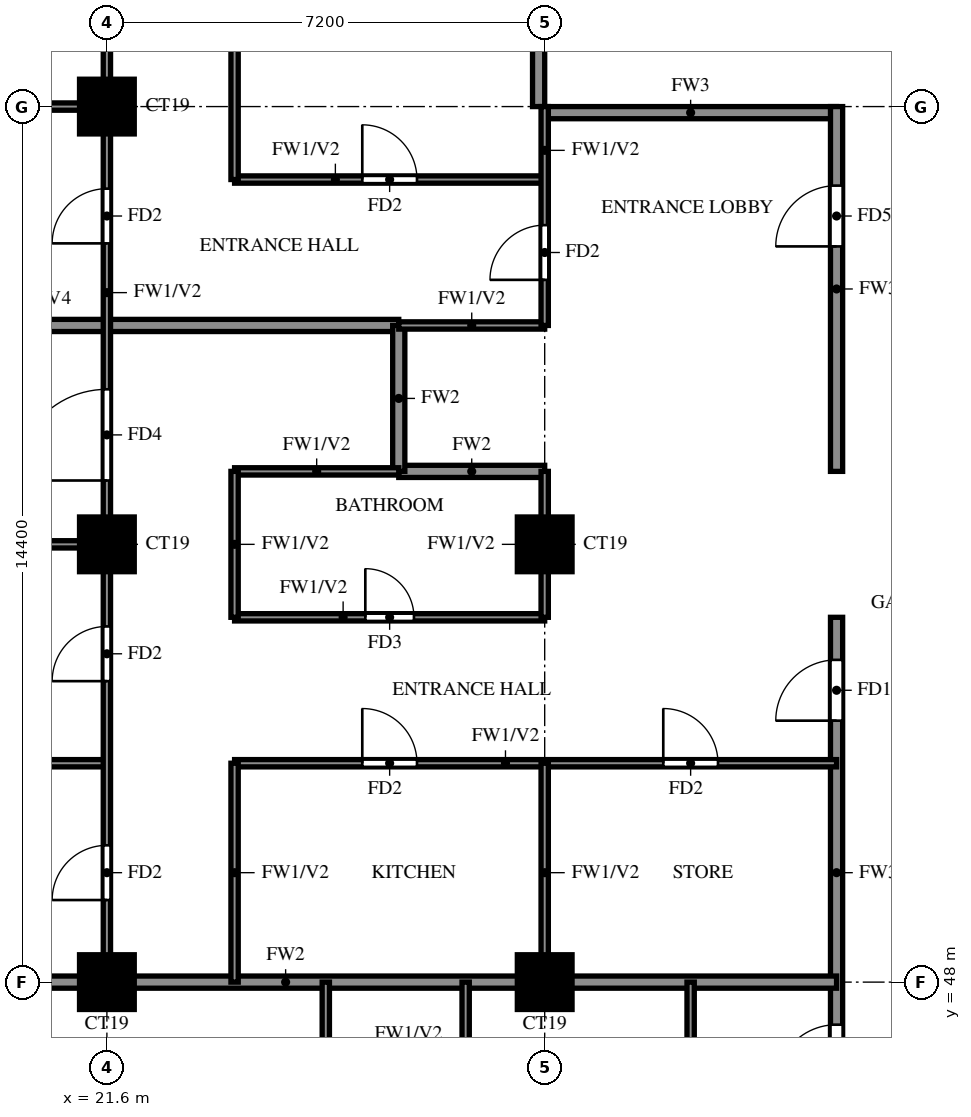
"""IFC4 building model, lengths in metres.
Left out: names, types, materials, properties, quantities, classifications, styles, units other than length and angle.
Written with IfcOpenShell. Run it as: python <this file> out.ifc"""

import sys

from ifc_helpers import new_model, si_unit, direction, frame, frame_2d, origin, origin_2d, place, context, subcontext, project, spatial, rectangle, extrude, source, transform, mapped, element, fill, save


model = new_model("IFC4")
c1 = context("Model", 3, precision=1e-05, world=origin(), true_north=direction((0.0, 1.0)))
c2 = subcontext(c1, "Body", "Model", "MODEL_VIEW")
j1 = project(units=[si_unit("LENGTHUNIT", "METRE"), si_unit("PLANEANGLEUNIT", "RADIAN")], contexts=[c1])
p1 = place(None, origin())
s1 = spatial("IfcSite", under=j1, at=p1, CompositionType="ELEMENT")
p2 = place(p1, origin())
s2 = spatial("IfcBuilding", under=s1, at=p2, CompositionType="ELEMENT")
p3 = place(p2, frame((0.0, 0.0, 188.5)))
s3 = spatial("IfcBuildingStorey", under=s2, at=p3, CompositionType="ELEMENT", Elevation=188.5)
m1 = source(origin(), c2, "Body", "SweptSolid", [
    extrude(rectangle(XDim=0.9, YDim=0.9, at=origin_2d()), origin(), (0.0, 0.0, 1.0), 3.2),
])
for number, where, z_axis, x_axis in (
    (1, (21.6, 48.0, 0.0), (0.0, 0.0, 1.0), (1.0, 0.0, 0.0)),
    (2, (28.8, 48.0, 0.0), (0.0, 0.0, 1.0), (1.0, 0.0, 0.0)),
    (3, (21.6, 55.2, 0.0), (0.0, 0.0, 1.0), (1.0, 0.0, 0.0)),
    (4, (28.8, 55.2, 0.0), (0.0, 0.0, 1.0), (1.0, 0.0, 0.0)),
    (5, (21.6, 62.4, 0.0), (0.0, 0.0, 1.0), (1.0, 0.0, 0.0)),
):
    element("IfcColumn", number, at=place(p3, frame(where, z_axis=z_axis, x_axis=x_axis)), inside=s3, PredefinedType="COLUMN", context=c2, shape_type="MappedRepresentation", body=[
        mapped(m1, transform((0.0, 0.0, 0.0))),
    ])
p4 = place(p3, frame((28.8, 62.3, 0.0), z_axis=(0.0, 0.0, 1.0), x_axis=(1.0, 0.0, 0.0)))
e6 = element("IfcWall", 6, at=p4, inside=s3, PredefinedType="SOLIDWALL", context=c2, shape_type="SweptSolid", body=[
    extrude(rectangle(XDim=4.8, YDim=0.2, at=frame_2d((2.4, 0.0))), origin(), (0.0, 0.0, 1.0), 3.2),
])
p5 = place(p3, frame((28.7, 62.4, 0.0), z_axis=(0.0, 0.0, 1.0), x_axis=(0.0, 1.0, 0.0)))
e7 = element("IfcWall", 7, at=p5, inside=s3, PredefinedType="SOLIDWALL", context=c2, shape_type="SweptSolid", body=[
    extrude(rectangle(XDim=15.6, YDim=0.2, at=frame_2d((7.8, 0.0))), origin(), (0.0, 0.0, 1.0), 3.2),
])
p6 = place(p3, frame((33.6, 45.6, 0.0), z_axis=(0.0, 0.0, 1.0), x_axis=(0.0, 1.0, 0.0)))
e8 = element("IfcWall", 8, at=p6, inside=s3, PredefinedType="SOLIDWALL", context=c2, shape_type="SweptSolid", body=[
    extrude(rectangle(XDim=8.4, YDim=0.2, at=frame_2d((4.2, 0.0))), origin(), (0.0, 0.0, 1.0), 3.2),
])
p7 = place(p6, frame((0.7, 0.0, 0.0)))
e9 = element("IfcOpeningElement", 9, at=p7, cuts=e8, PredefinedType="OPENING", context=c2, shape_type="SweptSolid", body=[
    extrude(rectangle(XDim=1.0, YDim=2.1, at=frame_2d((0.5, 1.05))), frame((0.0, 0.11, 0.0), z_axis=(0.0, -1.0, 0.0), x_axis=(1.0, 0.0, 0.0)), (0.0, 0.0, 1.0), 0.22),
])
p8 = place(p6, frame((6.7, 0.0, 0.0)))
e10 = element("IfcOpeningElement", 10, at=p8, cuts=e8, PredefinedType="OPENING", context=c2, shape_type="SweptSolid", body=[
    extrude(rectangle(XDim=1.0, YDim=2.1, at=frame_2d((0.5, 1.05))), frame((0.0, 0.11, 0.0), z_axis=(0.0, -1.0, 0.0), x_axis=(1.0, 0.0, 0.0)), (0.0, 0.0, 1.0), 0.22),
])
p9 = place(p3, frame((33.6, 56.4, 0.0), z_axis=(0.0, 0.0, 1.0), x_axis=(0.0, 1.0, 0.0)))
e11 = element("IfcWall", 11, at=p9, inside=s3, PredefinedType="SOLIDWALL", context=c2, shape_type="SweptSolid", body=[
    extrude(rectangle(XDim=6.0, YDim=0.2, at=frame_2d((3.0, 0.0))), origin(), (0.0, 0.0, 1.0), 3.2),
])
p10 = place(p9, frame((3.7, 0.0, 0.0)))
e12 = element("IfcOpeningElement", 12, at=p10, cuts=e11, PredefinedType="OPENING", context=c2, shape_type="SweptSolid", body=[
    extrude(rectangle(XDim=1.0, YDim=2.1, at=frame_2d((0.5, 1.05))), frame((0.0, 0.11, 0.0), z_axis=(0.0, -1.0, 0.0), x_axis=(1.0, 0.0, 0.0)), (0.0, 0.0, 1.0), 0.22),
])
p11 = place(p3, frame((14.525, 48.0, 0.0), z_axis=(0.0, 0.0, 1.0), x_axis=(1.0, 0.0, 0.0)))
e13 = element("IfcWall", 13, at=p11, inside=s3, PredefinedType="SOLIDWALL", context=c2, shape_type="SweptSolid", body=[
    extrude(rectangle(XDim=19.075, YDim=0.2, at=frame_2d((9.538, 0.0))), origin(), (0.0, 0.0, 1.0), 3.2),
])
p12 = place(p3, frame((26.4, 56.4, 0.0), z_axis=(0.0, 0.0, 1.0), x_axis=(1.0, 0.0, 0.0)))
e14 = element("IfcWall", 14, at=p12, inside=s3, PredefinedType="SOLIDWALL", context=c2, shape_type="SweptSolid", body=[
    extrude(rectangle(XDim=2.4, YDim=0.2, at=frame_2d((1.2, 0.0))), origin(), (0.0, 0.0, 1.0), 3.2),
])
p13 = place(p3, frame((14.525, 58.8, 0.0), z_axis=(0.0, 0.0, 1.0), x_axis=(1.0, 0.0, 0.0)))
e15 = element("IfcWall", 15, at=p13, inside=s3, PredefinedType="SOLIDWALL", context=c2, shape_type="SweptSolid", body=[
    extrude(rectangle(XDim=11.875, YDim=0.2, at=frame_2d((5.938, 0.0))), origin(), (0.0, 0.0, 1.0), 2.3),
])
p14 = place(p3, frame((26.4, 56.4, 0.0), z_axis=(0.0, 0.0, 1.0), x_axis=(0.0, 1.0, 0.0)))
e16 = element("IfcWall", 16, at=p14, inside=s3, PredefinedType="SOLIDWALL", context=c2, shape_type="SweptSolid", body=[
    extrude(rectangle(XDim=2.4, YDim=0.2, at=frame_2d((1.2, 0.0))), origin(), (0.0, 0.0, 1.0), 3.2),
])
p15 = place(p3, frame((14.525, 51.6, 0.0), z_axis=(0.0, 0.0, 1.0), x_axis=(1.0, 0.0, 0.0)))
e17 = element("IfcWall", 17, at=p15, inside=s3, PredefinedType="PARTITIONING", context=c2, shape_type="SweptSolid", body=[
    extrude(rectangle(XDim=7.075, YDim=0.12, at=frame_2d((3.538, 0.0))), origin(), (0.0, 0.0, 1.0), 2.3),
])
p16 = place(p3, frame((23.7, 51.6, 0.0), z_axis=(0.0, 0.0, 1.0), x_axis=(1.0, 0.0, 0.0)))
e18 = element("IfcWall", 18, at=p16, inside=s3, PredefinedType="PARTITIONING", context=c2, shape_type="SweptSolid", body=[
    extrude(rectangle(XDim=9.9, YDim=0.12, at=frame_2d((4.95, 0.0))), origin(), (0.0, 0.0, 1.0), 3.2),
])
p17 = place(p16, frame((2.1, 0.0, 0.0)))
e19 = element("IfcOpeningElement", 19, at=p17, cuts=e18, PredefinedType="OPENING", context=c2, shape_type="SweptSolid", body=[
    extrude(rectangle(XDim=0.9, YDim=2.1, at=frame_2d((0.45, 1.05))), frame((0.0, 0.07, 0.0), z_axis=(0.0, -1.0, 0.0), x_axis=(1.0, 0.0, 0.0)), (0.0, 0.0, 1.0), 0.14),
])
p18 = place(p16, frame((7.05, 0.0, 0.0)))
e20 = element("IfcOpeningElement", 20, at=p18, cuts=e18, PredefinedType="OPENING", context=c2, shape_type="SweptSolid", body=[
    extrude(rectangle(XDim=0.9, YDim=2.1, at=frame_2d((0.45, 1.05))), frame((0.0, 0.07, 0.0), z_axis=(0.0, -1.0, 0.0), x_axis=(1.0, 0.0, 0.0)), (0.0, 0.0, 1.0), 0.14),
])
p19 = place(p3, frame((23.7, 54.0, 0.0), z_axis=(0.0, 0.0, 1.0), x_axis=(1.0, 0.0, 0.0)))
e21 = element("IfcWall", 21, at=p19, inside=s3, PredefinedType="PARTITIONING", context=c2, shape_type="SweptSolid", body=[
    extrude(rectangle(XDim=5.1, YDim=0.12, at=frame_2d((2.55, 0.0))), origin(), (0.0, 0.0, 1.0), 3.2),
])
p20 = place(p19, frame((2.15, 0.0, 0.0)))
e22 = element("IfcOpeningElement", 22, at=p20, cuts=e21, PredefinedType="OPENING", context=c2, shape_type="SweptSolid", body=[
    extrude(rectangle(XDim=0.8, YDim=2.1, at=frame_2d((0.4, 1.05))), frame((0.0, 0.07, 0.0), z_axis=(0.0, -1.0, 0.0), x_axis=(1.0, 0.0, 0.0)), (0.0, 0.0, 1.0), 0.14),
])
p21 = place(p3, frame((14.525, 55.2, 0.0), z_axis=(0.0, 0.0, 1.0), x_axis=(1.0, 0.0, 0.0)))
e23 = element("IfcWall", 23, at=p21, inside=s3, PredefinedType="PARTITIONING", context=c2, shape_type="SweptSolid", body=[
    extrude(rectangle(XDim=7.075, YDim=0.12, at=frame_2d((3.538, 0.0))), origin(), (0.0, 0.0, 1.0), 3.2),
])
p22 = place(p3, frame((23.7, 56.4, 0.0), z_axis=(0.0, 0.0, 1.0), x_axis=(1.0, 0.0, 0.0)))
e24 = element("IfcWall", 24, at=p22, inside=s3, PredefinedType="PARTITIONING", context=c2, shape_type="SweptSolid", body=[
    extrude(rectangle(XDim=2.7, YDim=0.12, at=frame_2d((1.35, 0.0))), origin(), (0.0, 0.0, 1.0), 3.2),
])
p23 = place(p3, frame((26.4, 58.8, 0.0), z_axis=(0.0, 0.0, 1.0), x_axis=(1.0, 0.0, 0.0)))
e25 = element("IfcWall", 25, at=p23, inside=s3, PredefinedType="PARTITIONING", context=c2, shape_type="SweptSolid", body=[
    extrude(rectangle(XDim=2.4, YDim=0.12, at=frame_2d((1.2, 0.0))), origin(), (0.0, 0.0, 1.0), 3.2),
])
p24 = place(p3, frame((23.7, 61.2, 0.0), z_axis=(0.0, 0.0, 1.0), x_axis=(1.0, 0.0, 0.0)))
e26 = element("IfcWall", 26, at=p24, inside=s3, PredefinedType="PARTITIONING", context=c2, shape_type="SweptSolid", body=[
    extrude(rectangle(XDim=5.1, YDim=0.12, at=frame_2d((2.55, 0.0))), origin(), (0.0, 0.0, 1.0), 3.2),
])
p25 = place(p24, frame((2.1, 0.0, 0.0)))
e27 = element("IfcOpeningElement", 27, at=p25, cuts=e26, PredefinedType="OPENING", context=c2, shape_type="SweptSolid", body=[
    extrude(rectangle(XDim=0.9, YDim=2.1, at=frame_2d((0.45, 1.05))), frame((0.0, 0.07, 0.0), z_axis=(0.0, -1.0, 0.0), x_axis=(1.0, 0.0, 0.0)), (0.0, 0.0, 1.0), 0.14),
])
p26 = place(p3, frame((14.525, 62.4, 0.0), z_axis=(0.0, 0.0, 1.0), x_axis=(1.0, 0.0, 0.0)))
e28 = element("IfcWall", 28, at=p26, inside=s3, PredefinedType="PARTITIONING", context=c2, shape_type="SweptSolid", body=[
    extrude(rectangle(XDim=7.075, YDim=0.12, at=frame_2d((3.538, 0.0))), origin(), (0.0, 0.0, 1.0), 3.2),
])
p27 = place(p3, frame((21.6, 48.0, 0.0), z_axis=(0.0, 0.0, 1.0), x_axis=(0.0, 1.0, 0.0)))
e29 = element("IfcWall", 29, at=p27, inside=s3, PredefinedType="PARTITIONING", context=c2, shape_type="SweptSolid", body=[
    extrude(rectangle(XDim=25.2, YDim=0.12, at=frame_2d((12.6, 0.0))), origin(), (0.0, 0.0, 1.0), 3.2),
])
p28 = place(p27, frame((1.35, 0.0, 0.0)))
e30 = element("IfcOpeningElement", 30, at=p28, cuts=e29, PredefinedType="OPENING", context=c2, shape_type="SweptSolid", body=[
    extrude(rectangle(XDim=0.9, YDim=2.1, at=frame_2d((0.45, 1.05))), frame((0.0, 0.07, 0.0), z_axis=(0.0, -1.0, 0.0), x_axis=(1.0, 0.0, 0.0)), (0.0, 0.0, 1.0), 0.14),
])
p29 = place(p27, frame((4.95, 0.0, 0.0)))
e31 = element("IfcOpeningElement", 31, at=p29, cuts=e29, PredefinedType="OPENING", context=c2, shape_type="SweptSolid", body=[
    extrude(rectangle(XDim=0.9, YDim=2.1, at=frame_2d((0.45, 1.05))), frame((0.0, 0.07, 0.0), z_axis=(0.0, -1.0, 0.0), x_axis=(1.0, 0.0, 0.0)), (0.0, 0.0, 1.0), 0.14),
])
p30 = place(p27, frame((8.25, 0.0, 0.0)))
e32 = element("IfcOpeningElement", 32, at=p30, cuts=e29, PredefinedType="OPENING", context=c2, shape_type="SweptSolid", body=[
    extrude(rectangle(XDim=1.5, YDim=2.1, at=frame_2d((0.75, 1.05))), frame((0.0, 0.07, 0.0), z_axis=(0.0, -1.0, 0.0), x_axis=(1.0, 0.0, 0.0)), (0.0, 0.0, 1.0), 0.14),
])
p31 = place(p27, frame((12.15, 0.0, 0.0)))
e33 = element("IfcOpeningElement", 33, at=p31, cuts=e29, PredefinedType="OPENING", context=c2, shape_type="SweptSolid", body=[
    extrude(rectangle(XDim=0.9, YDim=2.1, at=frame_2d((0.45, 1.05))), frame((0.0, 0.07, 0.0), z_axis=(0.0, -1.0, 0.0), x_axis=(1.0, 0.0, 0.0)), (0.0, 0.0, 1.0), 0.14),
])
p32 = place(p27, frame((15.75, 0.0, 0.0)))
e34 = element("IfcOpeningElement", 34, at=p32, cuts=e29, PredefinedType="OPENING", context=c2, shape_type="SweptSolid", body=[
    extrude(rectangle(XDim=0.9, YDim=2.1, at=frame_2d((0.45, 1.05))), frame((0.0, 0.07, 0.0), z_axis=(0.0, -1.0, 0.0), x_axis=(1.0, 0.0, 0.0)), (0.0, 0.0, 1.0), 0.14),
])
p33 = place(p27, frame((19.35, 0.0, 0.0)))
e35 = element("IfcOpeningElement", 35, at=p33, cuts=e29, PredefinedType="OPENING", context=c2, shape_type="SweptSolid", body=[
    extrude(rectangle(XDim=0.9, YDim=2.1, at=frame_2d((0.45, 1.05))), frame((0.0, 0.07, 0.0), z_axis=(0.0, -1.0, 0.0), x_axis=(1.0, 0.0, 0.0)), (0.0, 0.0, 1.0), 0.14),
])
p34 = place(p27, frame((22.95, 0.0, 0.0)))
e36 = element("IfcOpeningElement", 36, at=p34, cuts=e29, PredefinedType="OPENING", context=c2, shape_type="SweptSolid", body=[
    extrude(rectangle(XDim=0.9, YDim=2.1, at=frame_2d((0.45, 1.05))), frame((0.0, 0.07, 0.0), z_axis=(0.0, -1.0, 0.0), x_axis=(1.0, 0.0, 0.0)), (0.0, 0.0, 1.0), 0.14),
])
p35 = place(p3, frame((23.7, 48.0, 0.0), z_axis=(0.0, 0.0, 1.0), x_axis=(0.0, 1.0, 0.0)))
e37 = element("IfcWall", 37, at=p35, inside=s3, PredefinedType="PARTITIONING", context=c2, shape_type="SweptSolid", body=[
    extrude(rectangle(XDim=3.6, YDim=0.12, at=frame_2d((1.8, 0.0))), origin(), (0.0, 0.0, 1.0), 3.2),
])
p36 = place(p3, frame((23.7, 54.0, 0.0), z_axis=(0.0, 0.0, 1.0), x_axis=(0.0, 1.0, 0.0)))
e38 = element("IfcWall", 38, at=p36, inside=s3, PredefinedType="PARTITIONING", context=c2, shape_type="SweptSolid", body=[
    extrude(rectangle(XDim=2.4, YDim=0.12, at=frame_2d((1.2, 0.0))), origin(), (0.0, 0.0, 1.0), 3.2),
])
p37 = place(p3, frame((23.7, 61.2, 0.0), z_axis=(0.0, 0.0, 1.0), x_axis=(0.0, 1.0, 0.0)))
e39 = element("IfcWall", 39, at=p37, inside=s3, PredefinedType="PARTITIONING", context=c2, shape_type="SweptSolid", body=[
    extrude(rectangle(XDim=12.0, YDim=0.12, at=frame_2d((6.0, 0.0))), origin(), (0.0, 0.0, 1.0), 3.2),
])
p38 = place(p37, frame((5.5, 0.0, 0.0)))
e40 = element("IfcOpeningElement", 40, at=p38, cuts=e39, PredefinedType="OPENING", context=c2, shape_type="SweptSolid", body=[
    extrude(rectangle(XDim=0.8, YDim=2.1, at=frame_2d((0.4, 1.05))), frame((0.0, 0.07, 0.0), z_axis=(0.0, -1.0, 0.0), x_axis=(1.0, 0.0, 0.0)), (0.0, 0.0, 1.0), 0.14),
])
p39 = place(p37, frame((9.125, 0.0, 0.0)))
e41 = element("IfcOpeningElement", 41, at=p39, cuts=e39, PredefinedType="OPENING", context=c2, shape_type="SweptSolid", body=[
    extrude(rectangle(XDim=0.9, YDim=2.1, at=frame_2d((0.45, 1.05))), frame((0.0, 0.07, 0.0), z_axis=(0.0, -1.0, 0.0), x_axis=(1.0, 0.0, 0.0)), (0.0, 0.0, 1.0), 0.14),
])
p40 = place(p3, frame((25.2, 39.725, 0.0), z_axis=(0.0, 0.0, 1.0), x_axis=(0.0, 1.0, 0.0)))
e42 = element("IfcWall", 42, at=p40, inside=s3, PredefinedType="PARTITIONING", context=c2, shape_type="SweptSolid", body=[
    extrude(rectangle(XDim=8.275, YDim=0.12, at=frame_2d((4.137, 0.0))), origin(), (0.0, 0.0, 1.0), 3.2),
])
p41 = place(p40, frame((4.525, 0.0, 0.0)))
e43 = element("IfcOpeningElement", 43, at=p41, cuts=e42, PredefinedType="OPENING", context=c2, shape_type="SweptSolid", body=[
    extrude(rectangle(XDim=0.9, YDim=2.1, at=frame_2d((0.45, 1.05))), frame((0.0, 0.07, 0.0), z_axis=(0.0, -1.0, 0.0), x_axis=(1.0, 0.0, 0.0)), (0.0, 0.0, 1.0), 0.14),
])
p42 = place(p3, frame((27.5, 45.6, 0.0), z_axis=(0.0, 0.0, 1.0), x_axis=(0.0, 1.0, 0.0)))
e44 = element("IfcWall", 44, at=p42, inside=s3, PredefinedType="PARTITIONING", context=c2, shape_type="SweptSolid", body=[
    extrude(rectangle(XDim=2.4, YDim=0.12, at=frame_2d((1.2, 0.0))), origin(), (0.0, 0.0, 1.0), 3.2),
])
p43 = place(p3, frame((28.8, 48.0, 0.0), z_axis=(0.0, 0.0, 1.0), x_axis=(0.0, 1.0, 0.0)))
e45 = element("IfcWall", 45, at=p43, inside=s3, PredefinedType="PARTITIONING", context=c2, shape_type="SweptSolid", body=[
    extrude(rectangle(XDim=3.6, YDim=0.12, at=frame_2d((1.8, 0.0))), origin(), (0.0, 0.0, 1.0), 3.2),
])
p44 = place(p3, frame((28.8, 54.0, 0.0), z_axis=(0.0, 0.0, 1.0), x_axis=(0.0, 1.0, 0.0)))
e46 = element("IfcWall", 46, at=p44, inside=s3, PredefinedType="PARTITIONING", context=c2, shape_type="SweptSolid", body=[
    extrude(rectangle(XDim=2.4, YDim=0.12, at=frame_2d((1.2, 0.0))), origin(), (0.0, 0.0, 1.0), 3.2),
])
p45 = place(p3, frame((28.8, 58.8, 0.0), z_axis=(0.0, 0.0, 1.0), x_axis=(0.0, 1.0, 0.0)))
e47 = element("IfcWall", 47, at=p45, inside=s3, PredefinedType="PARTITIONING", context=c2, shape_type="SweptSolid", body=[
    extrude(rectangle(XDim=3.6, YDim=0.12, at=frame_2d((1.8, 0.0))), origin(), (0.0, 0.0, 1.0), 3.2),
])
p46 = place(p45, frame((0.75, 0.0, 0.0)))
e48 = element("IfcOpeningElement", 48, at=p46, cuts=e47, PredefinedType="OPENING", context=c2, shape_type="SweptSolid", body=[
    extrude(rectangle(XDim=0.9, YDim=2.1, at=frame_2d((0.45, 1.05))), frame((0.0, 0.07, 0.0), z_axis=(0.0, -1.0, 0.0), x_axis=(1.0, 0.0, 0.0)), (0.0, 0.0, 1.0), 0.14),
])
p47 = place(p3, frame((31.2, 45.6, 0.0), z_axis=(0.0, 0.0, 1.0), x_axis=(0.0, 1.0, 0.0)))
e49 = element("IfcWall", 49, at=p47, inside=s3, PredefinedType="PARTITIONING", context=c2, shape_type="SweptSolid", body=[
    extrude(rectangle(XDim=2.4, YDim=0.12, at=frame_2d((1.2, 0.0))), origin(), (0.0, 0.0, 1.0), 3.2),
])
p48 = place(p7, origin())
e50 = element("IfcDoor", 50, at=p48, inside=s3, OperationType="SINGLE_SWING_LEFT", PredefinedType="DOOR", context=c2, shape_type="SweptSolid", body=[
    extrude(rectangle(XDim=1.0, YDim=2.1, at=frame_2d((0.5, 1.05))), frame((0.0, 0.025, 0.0), z_axis=(0.0, -1.0, 0.0), x_axis=(1.0, 0.0, 0.0)), (0.0, 0.0, 1.0), 0.05),
])
fill(e9, e50)
p49 = place(p8, origin())
e51 = element("IfcDoor", 51, at=p49, inside=s3, OperationType="SINGLE_SWING_RIGHT", PredefinedType="DOOR", context=c2, shape_type="SweptSolid", body=[
    extrude(rectangle(XDim=1.0, YDim=2.1, at=frame_2d((0.5, 1.05))), frame((0.0, 0.025, 0.0), z_axis=(0.0, -1.0, 0.0), x_axis=(1.0, 0.0, 0.0)), (0.0, 0.0, 1.0), 0.05),
])
fill(e10, e51)
p50 = place(p28, origin())
e52 = element("IfcDoor", 52, at=p50, inside=s3, OperationType="SINGLE_SWING_LEFT", PredefinedType="DOOR", context=c2, shape_type="SweptSolid", body=[
    extrude(rectangle(XDim=0.9, YDim=2.1, at=frame_2d((0.45, 1.05))), frame((0.0, 0.025, 0.0), z_axis=(0.0, -1.0, 0.0), x_axis=(1.0, 0.0, 0.0)), (0.0, 0.0, 1.0), 0.05),
])
fill(e30, e52)
p51 = place(p29, origin())
e53 = element("IfcDoor", 53, at=p51, inside=s3, OperationType="SINGLE_SWING_LEFT", PredefinedType="DOOR", context=c2, shape_type="SweptSolid", body=[
    extrude(rectangle(XDim=0.9, YDim=2.1, at=frame_2d((0.45, 1.05))), frame((0.0, 0.025, 0.0), z_axis=(0.0, -1.0, 0.0), x_axis=(1.0, 0.0, 0.0)), (0.0, 0.0, 1.0), 0.05),
])
fill(e31, e53)
p52 = place(p30, origin())
e54 = element("IfcDoor", 54, at=p52, inside=s3, OperationType="SINGLE_SWING_RIGHT", PredefinedType="DOOR", context=c2, shape_type="SweptSolid", body=[
    extrude(rectangle(XDim=1.5, YDim=2.1, at=frame_2d((0.75, 1.05))), frame((0.0, 0.025, 0.0), z_axis=(0.0, -1.0, 0.0), x_axis=(1.0, 0.0, 0.0)), (0.0, 0.0, 1.0), 0.05),
])
fill(e32, e54)
p53 = place(p17, origin())
e55 = element("IfcDoor", 55, at=p53, inside=s3, OperationType="SINGLE_SWING_LEFT", PredefinedType="DOOR", context=c2, shape_type="SweptSolid", body=[
    extrude(rectangle(XDim=0.9, YDim=2.1, at=frame_2d((0.45, 1.05))), frame((0.0, 0.025, 0.0), z_axis=(0.0, -1.0, 0.0), x_axis=(1.0, 0.0, 0.0)), (0.0, 0.0, 1.0), 0.05),
])
fill(e19, e55)
p54 = place(p20, origin())
e56 = element("IfcDoor", 56, at=p54, inside=s3, OperationType="SINGLE_SWING_LEFT", PredefinedType="DOOR", context=c2, shape_type="SweptSolid", body=[
    extrude(rectangle(XDim=0.8, YDim=2.1, at=frame_2d((0.4, 1.05))), frame((0.0, 0.025, 0.0), z_axis=(0.0, -1.0, 0.0), x_axis=(1.0, 0.0, 0.0)), (0.0, 0.0, 1.0), 0.05),
])
fill(e22, e56)
p55 = place(p18, origin())
e57 = element("IfcDoor", 57, at=p55, inside=s3, OperationType="SINGLE_SWING_RIGHT", PredefinedType="DOOR", context=c2, shape_type="SweptSolid", body=[
    extrude(rectangle(XDim=0.9, YDim=2.1, at=frame_2d((0.45, 1.05))), frame((0.0, 0.025, 0.0), z_axis=(0.0, -1.0, 0.0), x_axis=(1.0, 0.0, 0.0)), (0.0, 0.0, 1.0), 0.05),
])
fill(e20, e57)
p56 = place(p46, origin())
e58 = element("IfcDoor", 58, at=p56, inside=s3, OperationType="SINGLE_SWING_LEFT", PredefinedType="DOOR", context=c2, shape_type="SweptSolid", body=[
    extrude(rectangle(XDim=0.9, YDim=2.1, at=frame_2d((0.45, 1.05))), frame((0.0, 0.025, 0.0), z_axis=(0.0, -1.0, 0.0), x_axis=(1.0, 0.0, 0.0)), (0.0, 0.0, 1.0), 0.05),
])
fill(e48, e58)
p57 = place(p10, origin())
e59 = element("IfcDoor", 59, at=p57, inside=s3, OperationType="SINGLE_SWING_LEFT", PredefinedType="DOOR", context=c2, shape_type="SweptSolid", body=[
    extrude(rectangle(XDim=1.0, YDim=2.1, at=frame_2d((0.5, 1.05))), frame((0.0, 0.025, 0.0), z_axis=(0.0, -1.0, 0.0), x_axis=(1.0, 0.0, 0.0)), (0.0, 0.0, 1.0), 0.05),
])
fill(e12, e59)
p58 = place(p31, origin())
e60 = element("IfcDoor", 60, at=p58, inside=s3, OperationType="SINGLE_SWING_RIGHT", PredefinedType="DOOR", context=c2, shape_type="SweptSolid", body=[
    extrude(rectangle(XDim=0.9, YDim=2.1, at=frame_2d((0.45, 1.05))), frame((0.0, 0.025, 0.0), z_axis=(0.0, -1.0, 0.0), x_axis=(1.0, 0.0, 0.0)), (0.0, 0.0, 1.0), 0.05),
])
fill(e33, e60)
p59 = place(p25, origin())
e61 = element("IfcDoor", 61, at=p59, inside=s3, OperationType="SINGLE_SWING_LEFT", PredefinedType="DOOR", context=c2, shape_type="SweptSolid", body=[
    extrude(rectangle(XDim=0.9, YDim=2.1, at=frame_2d((0.45, 1.05))), frame((0.0, 0.025, 0.0), z_axis=(0.0, -1.0, 0.0), x_axis=(1.0, 0.0, 0.0)), (0.0, 0.0, 1.0), 0.05),
])
fill(e27, e61)
save(model, sys.argv[1])
